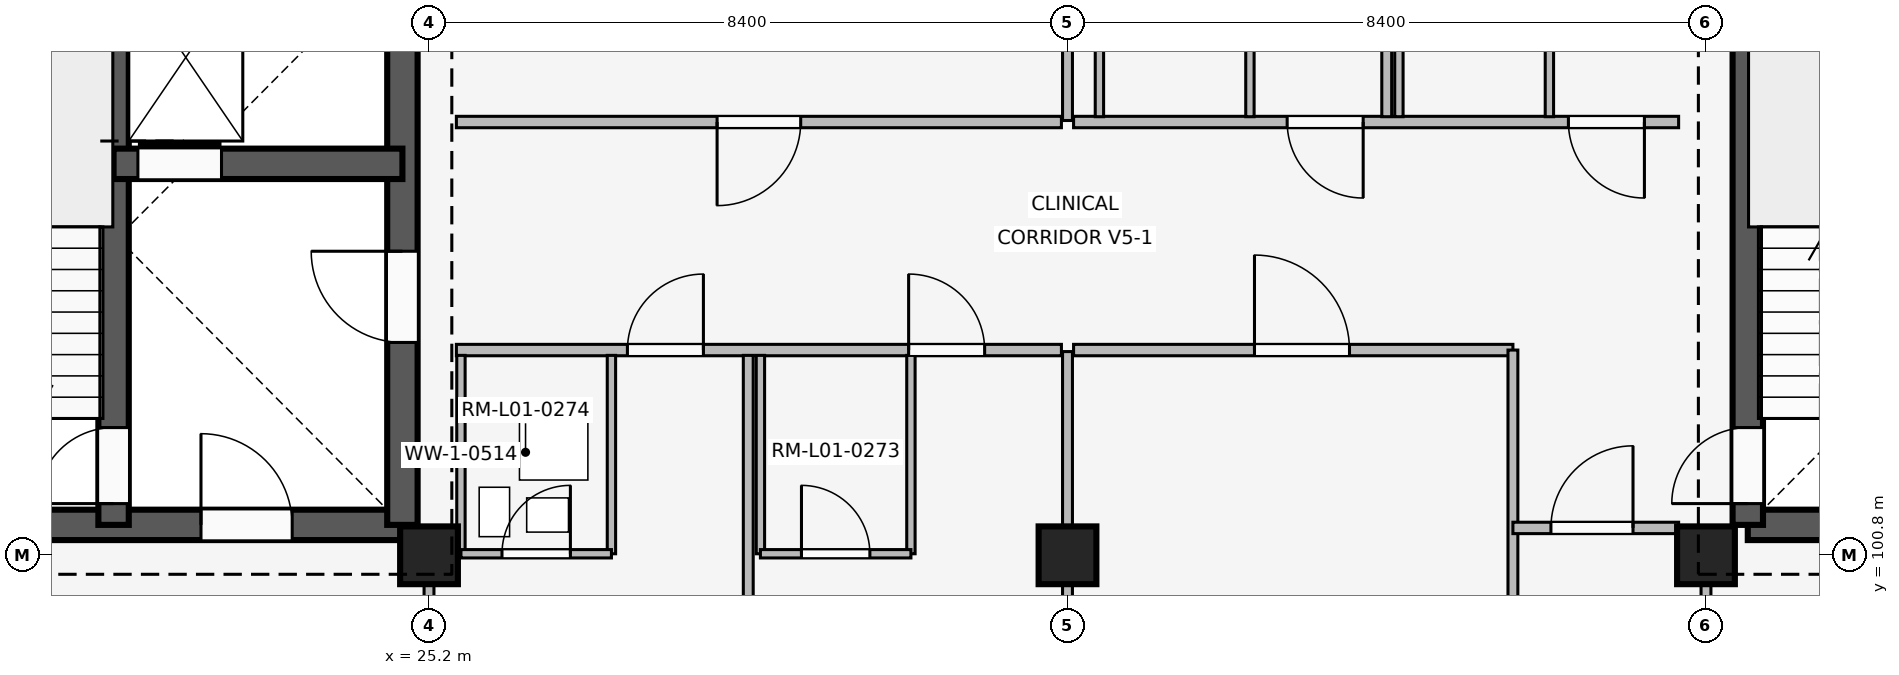
"""IFC4 building model, lengths in metres.
Left out: names, types, materials, properties, quantities, classifications, styles, units other than length and angle.
Written with IfcOpenShell. Run it as: python <this file> out.ifc"""

import sys

from ifc_helpers import new_model, si_unit, direction, frame, frame_2d, origin, origin_2d, place, context, subcontext, project, spatial, rectangle, extrude, element, fill, save


model = new_model("IFC4")
c1 = context("Model", 3, precision=1e-05, world=origin(), true_north=direction((0.0, 1.0)))
c2 = subcontext(c1, "Body", "Model", "MODEL_VIEW")
j1 = project(units=[si_unit("LENGTHUNIT", "METRE"), si_unit("PLANEANGLEUNIT", "RADIAN")], contexts=[c1])
p1 = place(None, origin())
s1 = spatial("IfcSite", under=j1, at=p1, CompositionType="ELEMENT")
p2 = place(p1, origin())
s2 = spatial("IfcBuilding", under=s1, at=p2, CompositionType="ELEMENT")
p3 = place(p2, frame((0.0, 0.0, 4.8)))
s3 = spatial("IfcBuildingStorey", under=s2, at=p3, CompositionType="ELEMENT", Elevation=4.8)
for number, where, z_axis, x_axis in (
    (1, (25.2, 100.8, 0.0), (0.0, 0.0, 1.0), (1.0, 0.0, 0.0)),
    (2, (33.6, 100.8, 0.0), (0.0, 0.0, 1.0), (1.0, 0.0, 0.0)),
    (3, (42.0, 100.8, 0.0), (0.0, 0.0, 1.0), (1.0, 0.0, 0.0)),
):
    element("IfcColumn", number, at=place(p3, frame(where, z_axis=z_axis, x_axis=x_axis)), inside=s3, PredefinedType="COLUMN", context=c2, shape_type="SweptSolid", body=[
        extrude(rectangle(XDim=0.76, YDim=0.76, at=origin_2d()), origin(), (0.0, 0.0, 1.0), 3.3),
    ])
p4 = place(p3, frame((42.55, 101.2, 0.0), z_axis=(0.0, 0.0, 1.0), x_axis=(1.0, 0.0, 0.0)))
e4 = element("IfcWall", 4, at=p4, inside=s3, PredefinedType="SHEAR", context=c2, shape_type="SweptSolid", body=[
    extrude(rectangle(XDim=7.5, YDim=0.4, at=frame_2d((3.75, 0.0))), origin(), (0.0, 0.0, 1.0), 3.02),
])
p5 = place(p4, frame((4.85, 0.0, 0.0)))
e5 = element("IfcOpeningElement", 5, at=p5, cuts=e4, PredefinedType="OPENING", context=c2, shape_type="SweptSolid", body=[
    extrude(rectangle(XDim=1.2, YDim=2.1, at=frame_2d((0.6, 1.05))), frame((0.0, 0.21, 0.0), z_axis=(0.0, -1.0, 0.0), x_axis=(1.0, 0.0, 0.0)), (0.0, 0.0, 1.0), 0.42),
])
p6 = place(p3, frame((42.55, 101.2, 0.0), z_axis=(0.0, 0.0, 1.0), x_axis=(0.0, 1.0, 0.0)))
e6 = element("IfcWall", 6, at=p6, inside=s3, PredefinedType="SHEAR", context=c2, shape_type="SweptSolid", body=[
    extrude(rectangle(XDim=7.55, YDim=0.4, at=frame_2d((3.775, 0.0))), origin(), (0.0, 0.0, 1.0), 3.02),
])
p7 = place(p6, frame((0.28, 0.0, 0.0)))
e7 = element("IfcOpeningElement", 7, at=p7, cuts=e6, PredefinedType="OPENING", context=c2, shape_type="SweptSolid", body=[
    extrude(rectangle(XDim=1.0, YDim=2.15, at=frame_2d((0.5, 1.075))), frame((0.0, 0.21, 0.0), z_axis=(0.0, -1.0, 0.0), x_axis=(1.0, 0.0, 0.0)), (0.0, 0.0, 1.0), 0.42),
])
p8 = place(p3, frame((17.35, 101.2, 0.0), z_axis=(0.0, 0.0, 1.0), x_axis=(1.0, 0.0, 0.0)))
e8 = element("IfcWall", 8, at=p8, inside=s3, PredefinedType="SHEAR", context=c2, shape_type="SweptSolid", body=[
    extrude(rectangle(XDim=7.5, YDim=0.4, at=frame_2d((3.75, 0.0))), origin(), (0.0, 0.0, 1.0), 3.02),
])
p9 = place(p8, frame((4.85, 0.0, 0.0)))
e9 = element("IfcOpeningElement", 9, at=p9, cuts=e8, PredefinedType="OPENING", context=c2, shape_type="SweptSolid", body=[
    extrude(rectangle(XDim=1.2, YDim=2.1, at=frame_2d((0.6, 1.05))), frame((0.0, 0.21, 0.0), z_axis=(0.0, -1.0, 0.0), x_axis=(1.0, 0.0, 0.0)), (0.0, 0.0, 1.0), 0.42),
])
p10 = place(p3, frame((24.85, 101.2, 0.0), z_axis=(0.0, 0.0, 1.0), x_axis=(0.0, 1.0, 0.0)))
e10 = element("IfcWall", 10, at=p10, inside=s3, PredefinedType="SHEAR", context=c2, shape_type="SweptSolid", body=[
    extrude(rectangle(XDim=7.55, YDim=0.4, at=frame_2d((3.775, 0.0))), origin(), (0.0, 0.0, 1.0), 3.02),
])
p11 = place(p10, frame((2.4, 0.0, 0.0)))
e11 = element("IfcOpeningElement", 11, at=p11, cuts=e10, PredefinedType="OPENING", context=c2, shape_type="SweptSolid", body=[
    extrude(rectangle(XDim=1.2, YDim=2.2, at=frame_2d((0.6, 1.1))), frame((0.0, 0.21, 0.0), z_axis=(0.0, -1.0, 0.0), x_axis=(1.0, 0.0, 0.0)), (0.0, 0.0, 1.0), 0.42),
])
p12 = place(p3, frame((21.05, 101.2, 0.0), z_axis=(0.0, 0.0, 1.0), x_axis=(0.0, 1.0, 0.0)))
e12 = element("IfcWall", 12, at=p12, inside=s3, PredefinedType="SHEAR", context=c2, shape_type="SweptSolid", body=[
    extrude(rectangle(XDim=7.55, YDim=0.4, at=frame_2d((3.775, 0.0))), origin(), (0.0, 0.0, 1.0), 3.02),
])
p13 = place(p12, frame((0.28, 0.0, 0.0)))
e13 = element("IfcOpeningElement", 13, at=p13, cuts=e12, PredefinedType="OPENING", context=c2, shape_type="SweptSolid", body=[
    extrude(rectangle(XDim=1.0, YDim=2.15, at=frame_2d((0.5, 1.075))), frame((0.0, 0.21, 0.0), z_axis=(0.0, -1.0, 0.0), x_axis=(1.0, 0.0, 0.0)), (0.0, 0.0, 1.0), 0.42),
])
p14 = place(p3, frame((21.05, 105.95, 0.0), z_axis=(0.0, 0.0, 1.0), x_axis=(1.0, 0.0, 0.0)))
e14 = element("IfcWall", 14, at=p14, inside=s3, PredefinedType="SHEAR", context=c2, shape_type="SweptSolid", body=[
    extrude(rectangle(XDim=3.8, YDim=0.4, at=frame_2d((1.9, 0.0))), origin(), (0.0, 0.0, 1.0), 3.02),
])
p15 = place(p14, frame((0.32, 0.0, 0.0)))
e15 = element("IfcOpeningElement", 15, at=p15, cuts=e14, PredefinedType="OPENING", context=c2, shape_type="SweptSolid", body=[
    extrude(rectangle(XDim=1.1, YDim=2.15, at=frame_2d((0.55, 1.075))), frame((0.0, 0.21, 0.0), z_axis=(0.0, -1.0, 0.0), x_axis=(1.0, 0.0, 0.0)), (0.0, 0.0, 1.0), 0.42),
])
p16 = place(p3, frame((25.2, 92.54, 0.0), z_axis=(0.0, 0.0, 1.0), x_axis=(0.0, 1.0, 0.0)))
e16 = element("IfcWall", 16, at=p16, inside=s3, PredefinedType="PARTITIONING", context=c2, shape_type="SweptSolid", body=[
    extrude(rectangle(XDim=8.21, YDim=0.13, at=frame_2d((4.105, 0.0))), origin(), (0.0, 0.0, 1.0), 2.4),
])
p17 = place(p16, frame((3.64, 0.0, 0.0)))
e17 = element("IfcOpeningElement", 17, at=p17, cuts=e16, PredefinedType="OPENING", context=c2, shape_type="SweptSolid", body=[
    extrude(rectangle(XDim=1.08, YDim=2.15, at=frame_2d((0.54, 1.075))), frame((0.0, 0.075, 0.0), z_axis=(0.0, -1.0, 0.0), x_axis=(1.0, 0.0, 0.0)), (0.0, 0.0, 1.0), 0.15),
])
p18 = place(p3, frame((25.56, 103.5, 0.0), z_axis=(0.0, 0.0, 1.0), x_axis=(1.0, 0.0, 0.0)))
e18 = element("IfcWall", 18, at=p18, inside=s3, PredefinedType="PARTITIONING", context=c2, shape_type="SweptSolid", body=[
    extrude(rectangle(XDim=7.96, YDim=0.15, at=frame_2d((3.98, 0.0))), origin(), (0.0, 0.0, 1.0), 2.4),
])
p19 = place(p18, frame((2.25, 0.0, 0.0)))
e19 = element("IfcOpeningElement", 19, at=p19, cuts=e18, PredefinedType="OPENING", context=c2, shape_type="SweptSolid", body=[
    extrude(rectangle(XDim=1.0, YDim=2.15, at=frame_2d((0.5, 1.075))), frame((0.0, 0.085, 0.0), z_axis=(0.0, -1.0, 0.0), x_axis=(1.0, 0.0, 0.0)), (0.0, 0.0, 1.0), 0.17),
])
p20 = place(p18, frame((5.95, 0.0, 0.0)))
e20 = element("IfcOpeningElement", 20, at=p20, cuts=e18, PredefinedType="OPENING", context=c2, shape_type="SweptSolid", body=[
    extrude(rectangle(XDim=1.0, YDim=2.15, at=frame_2d((0.5, 1.075))), frame((0.0, 0.085, 0.0), z_axis=(0.0, -1.0, 0.0), x_axis=(1.0, 0.0, 0.0)), (0.0, 0.0, 1.0), 0.17),
])
p21 = place(p3, frame((29.4, 92.5, 0.0), z_axis=(0.0, 0.0, 1.0), x_axis=(0.0, 1.0, 0.0)))
e21 = element("IfcWall", 21, at=p21, inside=s3, PredefinedType="PARTITIONING", context=c2, shape_type="SweptSolid", body=[
    extrude(rectangle(XDim=10.93, YDim=0.13, at=frame_2d((5.465, 0.0))), origin(), (0.0, 0.0, 1.0), 2.4),
])
for number, where, z_axis, x_axis in (
    (22, (25.62, 100.82, 0.0), (0.0, 0.0, 1.0), (0.0, 1.0, 0.0)),
    (23, (27.6, 100.82, 0.0), (0.0, 0.0, 1.0), (0.0, 1.0, 0.0)),
):
    element("IfcWall", number, at=place(p3, frame(where, z_axis=z_axis, x_axis=x_axis)), inside=s3, PredefinedType="PARTITIONING", context=c2, shape_type="SweptSolid", body=[
        extrude(rectangle(XDim=2.61, YDim=0.11, at=frame_2d((1.305, 0.0))), origin(), (0.0, 0.0, 1.0), 2.4),
    ])
p22 = place(p3, frame((25.62, 100.82, 0.0), z_axis=(0.0, 0.0, 1.0), x_axis=(1.0, 0.0, 0.0)))
e24 = element("IfcWall", 24, at=p22, inside=s3, PredefinedType="PARTITIONING", context=c2, shape_type="SweptSolid", body=[
    extrude(rectangle(XDim=1.98, YDim=0.11, at=frame_2d((0.99, 0.0))), origin(), (0.0, 0.0, 1.0), 2.4),
])
p23 = place(p22, frame((0.54, 0.0, 0.0)))
e25 = element("IfcOpeningElement", 25, at=p23, cuts=e24, PredefinedType="OPENING", context=c2, shape_type="SweptSolid", body=[
    extrude(rectangle(XDim=0.9, YDim=2.1, at=frame_2d((0.45, 1.05))), frame((0.0, 0.065, 0.0), z_axis=(0.0, -1.0, 0.0), x_axis=(1.0, 0.0, 0.0)), (0.0, 0.0, 1.0), 0.13),
])
for number, where, z_axis, x_axis in (
    (26, (29.56, 100.82, 0.0), (0.0, 0.0, 1.0), (0.0, 1.0, 0.0)),
    (27, (31.54, 100.82, 0.0), (0.0, 0.0, 1.0), (0.0, 1.0, 0.0)),
):
    element("IfcWall", number, at=place(p3, frame(where, z_axis=z_axis, x_axis=x_axis)), inside=s3, PredefinedType="PARTITIONING", context=c2, shape_type="SweptSolid", body=[
        extrude(rectangle(XDim=2.61, YDim=0.11, at=frame_2d((1.305, 0.0))), origin(), (0.0, 0.0, 1.0), 2.4),
    ])
p24 = place(p3, frame((29.56, 100.82, 0.0), z_axis=(0.0, 0.0, 1.0), x_axis=(1.0, 0.0, 0.0)))
e28 = element("IfcWall", 28, at=p24, inside=s3, PredefinedType="PARTITIONING", context=c2, shape_type="SweptSolid", body=[
    extrude(rectangle(XDim=1.98, YDim=0.11, at=frame_2d((0.99, 0.0))), origin(), (0.0, 0.0, 1.0), 2.4),
])
p25 = place(p24, frame((0.54, 0.0, 0.0)))
e29 = element("IfcOpeningElement", 29, at=p25, cuts=e28, PredefinedType="OPENING", context=c2, shape_type="SweptSolid", body=[
    extrude(rectangle(XDim=0.9, YDim=2.1, at=frame_2d((0.45, 1.05))), frame((0.0, 0.065, 0.0), z_axis=(0.0, -1.0, 0.0), x_axis=(1.0, 0.0, 0.0)), (0.0, 0.0, 1.0), 0.13),
])
p26 = place(p3, frame((33.52, 106.5, 0.0), z_axis=(0.0, 0.0, 1.0), x_axis=(-1.0, 0.0, 0.0)))
e30 = element("IfcWall", 30, at=p26, inside=s3, PredefinedType="PARTITIONING", context=c2, shape_type="SweptSolid", body=[
    extrude(rectangle(XDim=7.96, YDim=0.15, at=frame_2d((3.98, 0.0))), origin(), (0.0, 0.0, 1.0), 2.4),
])
p27 = place(p26, frame((3.43, 0.0, 0.0)))
e31 = element("IfcOpeningElement", 31, at=p27, cuts=e30, PredefinedType="OPENING", context=c2, shape_type="SweptSolid", body=[
    extrude(rectangle(XDim=1.1, YDim=2.2, at=frame_2d((0.55, 1.1))), frame((0.0, 0.085, 0.0), z_axis=(0.0, -1.0, 0.0), x_axis=(1.0, 0.0, 0.0)), (0.0, 0.0, 1.0), 0.17),
])
for number, where, z_axis, x_axis in (
    (32, (33.6, 92.54, 0.0), (0.0, 0.0, 1.0), (0.0, 1.0, 0.0)),
    (33, (33.6, 106.52, 0.0), (0.0, 0.0, 1.0), (0.0, 1.0, 0.0)),
):
    element("IfcWall", number, at=place(p3, frame(where, z_axis=z_axis, x_axis=x_axis)), inside=s3, PredefinedType="PARTITIONING", context=c2, shape_type="SweptSolid", body=[
        extrude(rectangle(XDim=10.94, YDim=0.13, at=frame_2d((5.47, 0.0))), origin(), (0.0, 0.0, 1.0), 2.4),
    ])
p28 = place(p3, frame((33.68, 103.5, 0.0), z_axis=(0.0, 0.0, 1.0), x_axis=(1.0, 0.0, 0.0)))
e34 = element("IfcWall", 34, at=p28, inside=s3, PredefinedType="PARTITIONING", context=c2, shape_type="SweptSolid", body=[
    extrude(rectangle(XDim=5.78, YDim=0.15, at=frame_2d((2.89, 0.0))), origin(), (0.0, 0.0, 1.0), 2.4),
])
p29 = place(p28, frame((2.38, 0.0, 0.0)))
e35 = element("IfcOpeningElement", 35, at=p29, cuts=e34, PredefinedType="OPENING", context=c2, shape_type="SweptSolid", body=[
    extrude(rectangle(XDim=1.25, YDim=2.2, at=frame_2d((0.625, 1.1))), frame((0.0, 0.085, 0.0), z_axis=(0.0, -1.0, 0.0), x_axis=(1.0, 0.0, 0.0)), (0.0, 0.0, 1.0), 0.17),
])
p30 = place(p3, frame((39.46, 92.56, 0.0), z_axis=(0.0, 0.0, 1.0), x_axis=(0.0, 1.0, 0.0)))
e36 = element("IfcWall", 36, at=p30, inside=s3, PredefinedType="PARTITIONING", context=c2, shape_type="SweptSolid", body=[
    extrude(rectangle(XDim=10.94, YDim=0.13, at=frame_2d((5.47, 0.0))), origin(), (0.0, 0.0, 1.0), 2.4),
])
p31 = place(p3, frame((39.46, 101.16, 0.0), z_axis=(0.0, 0.0, 1.0), x_axis=(1.0, 0.0, 0.0)))
e37 = element("IfcWall", 37, at=p31, inside=s3, PredefinedType="PARTITIONING", context=c2, shape_type="SweptSolid", body=[
    extrude(rectangle(XDim=2.18, YDim=0.15, at=frame_2d((1.09, 0.0))), origin(), (0.0, 0.0, 1.0), 2.4),
])
p32 = place(p31, frame((0.5, 0.0, 0.0)))
e38 = element("IfcOpeningElement", 38, at=p32, cuts=e37, PredefinedType="OPENING", context=c2, shape_type="SweptSolid", body=[
    extrude(rectangle(XDim=1.08, YDim=2.15, at=frame_2d((0.54, 1.075))), frame((0.0, 0.085, 0.0), z_axis=(0.0, -1.0, 0.0), x_axis=(1.0, 0.0, 0.0)), (0.0, 0.0, 1.0), 0.17),
])
p33 = place(p3, frame((41.64, 106.5, 0.0), z_axis=(0.0, 0.0, 1.0), x_axis=(-1.0, 0.0, 0.0)))
e39 = element("IfcWall", 39, at=p33, inside=s3, PredefinedType="PARTITIONING", context=c2, shape_type="SweptSolid", body=[
    extrude(rectangle(XDim=7.96, YDim=0.15, at=frame_2d((3.98, 0.0))), origin(), (0.0, 0.0, 1.0), 2.4),
])
p34 = place(p33, frame((0.45, 0.0, 0.0)))
e40 = element("IfcOpeningElement", 40, at=p34, cuts=e39, PredefinedType="OPENING", context=c2, shape_type="SweptSolid", body=[
    extrude(rectangle(XDim=1.0, YDim=2.15, at=frame_2d((0.5, 1.075))), frame((0.0, 0.085, 0.0), z_axis=(0.0, -1.0, 0.0), x_axis=(1.0, 0.0, 0.0)), (0.0, 0.0, 1.0), 0.17),
])
p35 = place(p33, frame((4.15, 0.0, 0.0)))
e41 = element("IfcOpeningElement", 41, at=p35, cuts=e39, PredefinedType="OPENING", context=c2, shape_type="SweptSolid", body=[
    extrude(rectangle(XDim=1.0, YDim=2.15, at=frame_2d((0.5, 1.075))), frame((0.0, 0.085, 0.0), z_axis=(0.0, -1.0, 0.0), x_axis=(1.0, 0.0, 0.0)), (0.0, 0.0, 1.0), 0.17),
])
p36 = place(p3, frame((37.8, 106.57, 0.0), z_axis=(0.0, 0.0, 1.0), x_axis=(0.0, 1.0, 0.0)))
e42 = element("IfcWall", 42, at=p36, inside=s3, PredefinedType="PARTITIONING", context=c2, shape_type="SweptSolid", body=[
    extrude(rectangle(XDim=10.93, YDim=0.13, at=frame_2d((5.465, 0.0))), origin(), (0.0, 0.0, 1.0), 2.4),
])
for number, where, z_axis, x_axis in (
    (43, (34.02, 106.57, 0.0), (0.0, 0.0, 1.0), (0.0, 1.0, 0.0)),
    (44, (36.0, 106.57, 0.0), (0.0, 0.0, 1.0), (0.0, 1.0, 0.0)),
    (45, (37.96, 106.57, 0.0), (0.0, 0.0, 1.0), (0.0, 1.0, 0.0)),
    (46, (39.94, 106.57, 0.0), (0.0, 0.0, 1.0), (0.0, 1.0, 0.0)),
):
    element("IfcWall", number, at=place(p3, frame(where, z_axis=z_axis, x_axis=x_axis)), inside=s3, PredefinedType="PARTITIONING", context=c2, shape_type="SweptSolid", body=[
        extrude(rectangle(XDim=2.61, YDim=0.11, at=frame_2d((1.305, 0.0))), origin(), (0.0, 0.0, 1.0), 2.4),
    ])
p37 = place(p3, frame((42.0, 92.54, 0.0), z_axis=(0.0, 0.0, 1.0), x_axis=(0.0, 1.0, 0.0)))
e47 = element("IfcWall", 47, at=p37, inside=s3, PredefinedType="PARTITIONING", context=c2, shape_type="SweptSolid", body=[
    extrude(rectangle(XDim=8.21, YDim=0.13, at=frame_2d((4.105, 0.0))), origin(), (0.0, 0.0, 1.0), 2.4),
])
p38 = place(p37, frame((3.64, 0.0, 0.0)))
e48 = element("IfcOpeningElement", 48, at=p38, cuts=e47, PredefinedType="OPENING", context=c2, shape_type="SweptSolid", body=[
    extrude(rectangle(XDim=1.08, YDim=2.15, at=frame_2d((0.54, 1.075))), frame((0.0, 0.075, 0.0), z_axis=(0.0, -1.0, 0.0), x_axis=(1.0, 0.0, 0.0)), (0.0, 0.0, 1.0), 0.15),
])
p39 = place(p7, origin())
e49 = element("IfcDoor", 49, at=p39, inside=s3, OperationType="SINGLE_SWING_LEFT", PredefinedType="DOOR", context=c2, shape_type="SweptSolid", body=[
    extrude(rectangle(XDim=1.0, YDim=2.15, at=frame_2d((0.5, 1.075))), frame((0.0, 0.025, 0.0), z_axis=(0.0, -1.0, 0.0), x_axis=(1.0, 0.0, 0.0)), (0.0, 0.0, 1.0), 0.05),
])
fill(e7, e49)
p40 = place(p11, origin())
e50 = element("IfcDoor", 50, at=p40, inside=s3, OperationType="SINGLE_SWING_RIGHT", PredefinedType="DOOR", context=c2, shape_type="SweptSolid", body=[
    extrude(rectangle(XDim=1.2, YDim=2.2, at=frame_2d((0.6, 1.1))), frame((0.0, 0.025, 0.0), z_axis=(0.0, -1.0, 0.0), x_axis=(1.0, 0.0, 0.0)), (0.0, 0.0, 1.0), 0.05),
])
fill(e11, e50)
p41 = place(p9, origin())
e51 = element("IfcDoor", 51, at=p41, inside=s3, OperationType="SINGLE_SWING_LEFT", PredefinedType="DOOR", context=c2, shape_type="SweptSolid", body=[
    extrude(rectangle(XDim=1.2, YDim=2.1, at=frame_2d((0.6, 1.05))), frame((0.0, 0.025, 0.0), z_axis=(0.0, -1.0, 0.0), x_axis=(1.0, 0.0, 0.0)), (0.0, 0.0, 1.0), 0.05),
])
fill(e9, e51)
p42 = place(p13, origin())
e52 = element("IfcDoor", 52, at=p42, inside=s3, OperationType="SINGLE_SWING_LEFT", PredefinedType="DOOR", context=c2, shape_type="SweptSolid", body=[
    extrude(rectangle(XDim=1.0, YDim=2.15, at=frame_2d((0.5, 1.075))), frame((0.0, 0.025, 0.0), z_axis=(0.0, -1.0, 0.0), x_axis=(1.0, 0.0, 0.0)), (0.0, 0.0, 1.0), 0.05),
])
fill(e13, e52)
p43 = place(p15, origin())
e53 = element("IfcDoor", 53, at=p43, inside=s3, OperationType="SLIDING_TO_LEFT", PredefinedType="DOOR", context=c2, shape_type="SweptSolid", body=[
    extrude(rectangle(XDim=1.1, YDim=2.15, at=frame_2d((0.55, 1.075))), frame((0.0, 0.025, 0.0), z_axis=(0.0, -1.0, 0.0), x_axis=(1.0, 0.0, 0.0)), (0.0, 0.0, 1.0), 0.05),
])
fill(e15, e53)
p44 = place(p19, origin())
e54 = element("IfcDoor", 54, at=p44, inside=s3, OperationType="SINGLE_SWING_RIGHT", PredefinedType="DOOR", context=c2, shape_type="SweptSolid", body=[
    extrude(rectangle(XDim=1.0, YDim=2.15, at=frame_2d((0.5, 1.075))), frame((0.0, 0.025, 0.0), z_axis=(0.0, -1.0, 0.0), x_axis=(1.0, 0.0, 0.0)), (0.0, 0.0, 1.0), 0.05),
])
fill(e19, e54)
p45 = place(p20, origin())
e55 = element("IfcDoor", 55, at=p45, inside=s3, OperationType="SINGLE_SWING_LEFT", PredefinedType="DOOR", context=c2, shape_type="SweptSolid", body=[
    extrude(rectangle(XDim=1.0, YDim=2.15, at=frame_2d((0.5, 1.075))), frame((0.0, 0.025, 0.0), z_axis=(0.0, -1.0, 0.0), x_axis=(1.0, 0.0, 0.0)), (0.0, 0.0, 1.0), 0.05),
])
fill(e20, e55)
p46 = place(p23, origin())
e56 = element("IfcDoor", 56, at=p46, inside=s3, OperationType="SINGLE_SWING_RIGHT", PredefinedType="DOOR", context=c2, shape_type="SweptSolid", body=[
    extrude(rectangle(XDim=0.9, YDim=2.1, at=frame_2d((0.45, 1.05))), frame((0.0, 0.025, 0.0), z_axis=(0.0, -1.0, 0.0), x_axis=(1.0, 0.0, 0.0)), (0.0, 0.0, 1.0), 0.05),
])
fill(e25, e56)
p47 = place(p25, origin())
e57 = element("IfcDoor", 57, at=p47, inside=s3, OperationType="SINGLE_SWING_LEFT", PredefinedType="DOOR", context=c2, shape_type="SweptSolid", body=[
    extrude(rectangle(XDim=0.9, YDim=2.1, at=frame_2d((0.45, 1.05))), frame((0.0, 0.025, 0.0), z_axis=(0.0, -1.0, 0.0), x_axis=(1.0, 0.0, 0.0)), (0.0, 0.0, 1.0), 0.05),
])
fill(e29, e57)
p48 = place(p27, origin())
e58 = element("IfcDoor", 58, at=p48, inside=s3, OperationType="SINGLE_SWING_RIGHT", PredefinedType="DOOR", context=c2, shape_type="SweptSolid", body=[
    extrude(rectangle(XDim=1.1, YDim=2.2, at=frame_2d((0.55, 1.1))), frame((0.0, 0.025, 0.0), z_axis=(0.0, -1.0, 0.0), x_axis=(1.0, 0.0, 0.0)), (0.0, 0.0, 1.0), 0.05),
])
fill(e31, e58)
p49 = place(p29, origin())
e59 = element("IfcDoor", 59, at=p49, inside=s3, OperationType="SINGLE_SWING_LEFT", PredefinedType="DOOR", context=c2, shape_type="SweptSolid", body=[
    extrude(rectangle(XDim=1.25, YDim=2.2, at=frame_2d((0.625, 1.1))), frame((0.0, 0.025, 0.0), z_axis=(0.0, -1.0, 0.0), x_axis=(1.0, 0.0, 0.0)), (0.0, 0.0, 1.0), 0.05),
])
fill(e35, e59)
p50 = place(p32, origin())
e60 = element("IfcDoor", 60, at=p50, inside=s3, OperationType="SINGLE_SWING_RIGHT", PredefinedType="DOOR", context=c2, shape_type="SweptSolid", body=[
    extrude(rectangle(XDim=1.08, YDim=2.15, at=frame_2d((0.54, 1.075))), frame((0.0, 0.025, 0.0), z_axis=(0.0, -1.0, 0.0), x_axis=(1.0, 0.0, 0.0)), (0.0, 0.0, 1.0), 0.05),
])
fill(e38, e60)
p51 = place(p34, origin())
e61 = element("IfcDoor", 61, at=p51, inside=s3, OperationType="SINGLE_SWING_LEFT", PredefinedType="DOOR", context=c2, shape_type="SweptSolid", body=[
    extrude(rectangle(XDim=1.0, YDim=2.15, at=frame_2d((0.5, 1.075))), frame((0.0, 0.025, 0.0), z_axis=(0.0, -1.0, 0.0), x_axis=(1.0, 0.0, 0.0)), (0.0, 0.0, 1.0), 0.05),
])
fill(e40, e61)
p52 = place(p35, origin())
e62 = element("IfcDoor", 62, at=p52, inside=s3, OperationType="SINGLE_SWING_LEFT", PredefinedType="DOOR", context=c2, shape_type="SweptSolid", body=[
    extrude(rectangle(XDim=1.0, YDim=2.15, at=frame_2d((0.5, 1.075))), frame((0.0, 0.025, 0.0), z_axis=(0.0, -1.0, 0.0), x_axis=(1.0, 0.0, 0.0)), (0.0, 0.0, 1.0), 0.05),
])
fill(e41, e62)
save(model, sys.argv[1])
